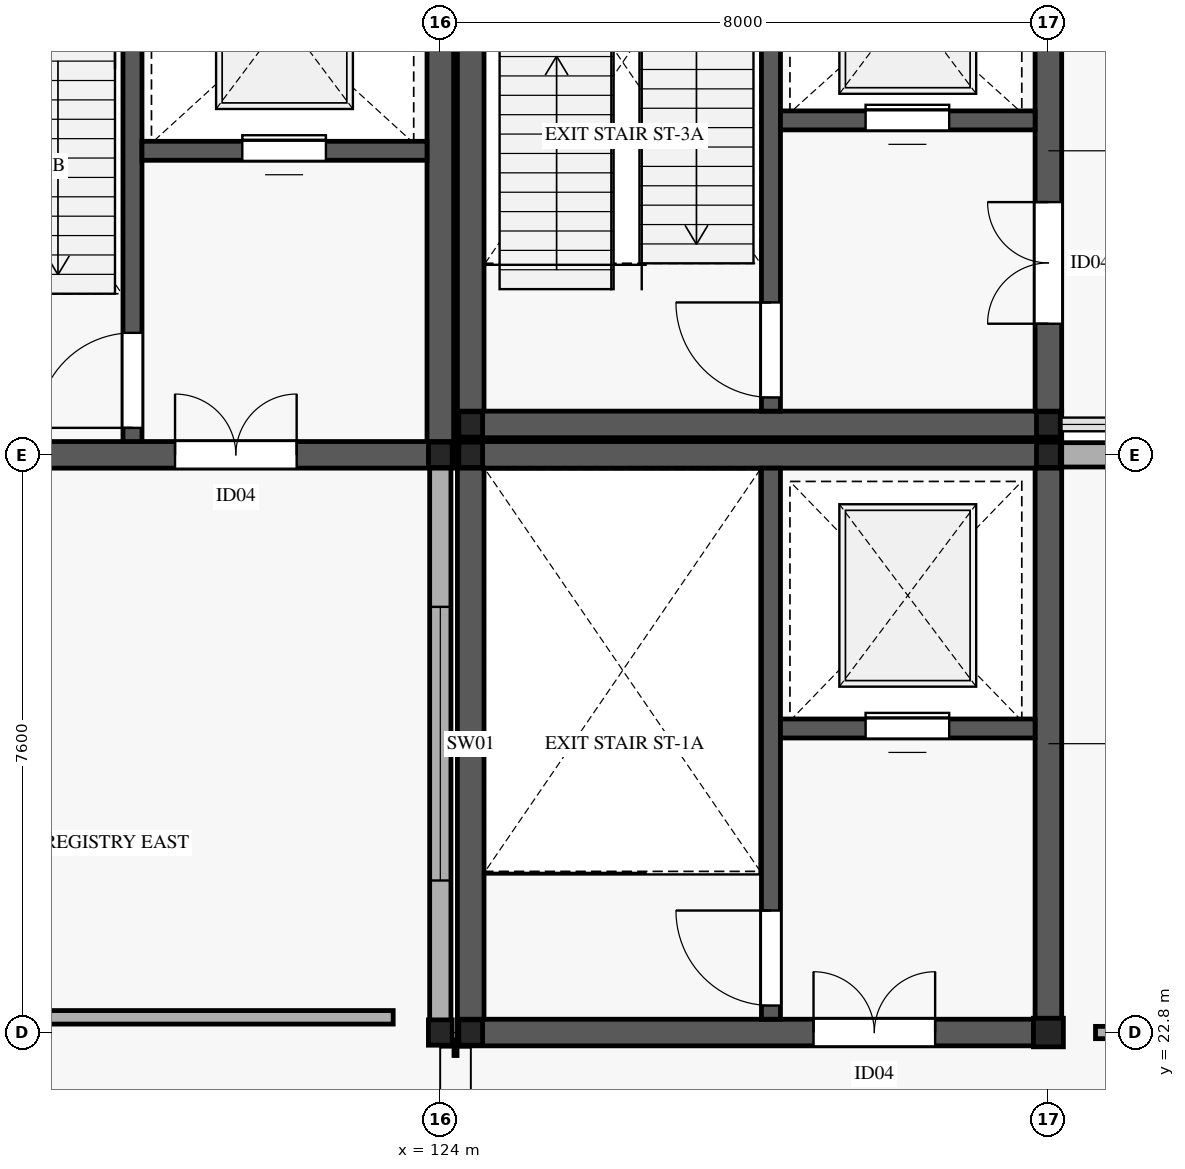
"""IFC4 building model, lengths in metres.
Left out: names, types, materials, properties, quantities, classifications, styles, units other than length and angle.
Written with IfcOpenShell. Run it as: python <this file> out.ifc"""

import sys

from ifc_helpers import new_model, si_unit, direction, frame, frame_2d, origin, origin_2d, place, context, subcontext, project, spatial, rectangle, i_section, extrude, element, fill, save


model = new_model("IFC4")
c1 = context("Model", 3, precision=1e-05, world=origin(), true_north=direction((0.0, 1.0)))
c2 = subcontext(c1, "Body", "Model", "MODEL_VIEW")
j1 = project(units=[si_unit("LENGTHUNIT", "METRE"), si_unit("PLANEANGLEUNIT", "RADIAN")], contexts=[c1])
p1 = place(None, origin())
s1 = spatial("IfcSite", under=j1, at=p1, CompositionType="ELEMENT")
p2 = place(p1, origin())
s2 = spatial("IfcBuilding", under=s1, at=p2, CompositionType="ELEMENT")
p3 = place(p2, frame((0.0, 0.0, 15.6)))
s3 = spatial("IfcBuildingStorey", under=s2, at=p3, CompositionType="ELEMENT", Elevation=15.6)
for number, where, z_axis, x_axis in (
    (1, (124.4, 22.8, 0.0), (0.0, 0.0, 1.0), (1.0, 0.0, 0.0)),
    (2, (124.4, 30.4, 0.0), (0.0, 0.0, 1.0), (1.0, 0.0, 0.0)),
):
    element("IfcColumn", number, at=place(p3, frame(where, z_axis=z_axis, x_axis=x_axis)), inside=s3, PredefinedType="COLUMN", context=c2, shape_type="SweptSolid", body=[
        extrude(i_section(OverallWidth=0.313, OverallDepth=0.333, WebThickness=0.018, FlangeThickness=0.028, FilletRadius=0.015, at=origin_2d()), origin(), (0.0, 0.0, 1.0), 4.595),
    ])
p4 = place(p3, frame((132.0, 22.8, 0.0), z_axis=(0.0, 0.0, 1.0), x_axis=(1.0, 0.0, 0.0)))
e3 = element("IfcColumn", 3, at=p4, inside=s3, PredefinedType="COLUMN", context=c2, shape_type="SweptSolid", body=[
    extrude(i_section(OverallWidth=0.394, OverallDepth=0.376, WebThickness=0.017, FlangeThickness=0.028, FilletRadius=0.015, at=origin_2d()), origin(), (0.0, 0.0, 1.0), 4.595),
])
p5 = place(p3, frame((132.0, 30.4, 0.0), z_axis=(0.0, 0.0, 1.0), x_axis=(1.0, 0.0, 0.0)))
e4 = element("IfcColumn", 4, at=p5, inside=s3, PredefinedType="COLUMN", context=c2, shape_type="SweptSolid", body=[
    extrude(i_section(OverallWidth=0.313, OverallDepth=0.333, WebThickness=0.018, FlangeThickness=0.028, FilletRadius=0.015, at=origin_2d()), origin(), (0.0, 0.0, 1.0), 4.595),
])
for number, where, z_axis, x_axis in (
    (5, (124.4, 30.8, 0.0), (0.0, 0.0, 1.0), (1.0, 0.0, 0.0)),
    (6, (132.0, 30.8, 0.0), (0.0, 0.0, 1.0), (1.0, 0.0, 0.0)),
):
    element("IfcColumn", number, at=place(p3, frame(where, z_axis=z_axis, x_axis=x_axis)), inside=s3, PredefinedType="COLUMN", context=c2, shape_type="SweptSolid", body=[
        extrude(i_section(OverallWidth=0.313, OverallDepth=0.333, WebThickness=0.018, FlangeThickness=0.028, FilletRadius=0.015, at=origin_2d()), origin(), (0.0, 0.0, 1.0), 4.545),
    ])
for number, where, z_axis, x_axis in (
    (7, (124.0, 22.8, 0.0), (0.0, 0.0, 1.0), (1.0, 0.0, 0.0)),
    (8, (124.0, 30.4, 0.0), (0.0, 0.0, 1.0), (1.0, 0.0, 0.0)),
):
    element("IfcColumn", number, at=place(p3, frame(where, z_axis=z_axis, x_axis=x_axis)), inside=s3, PredefinedType="COLUMN", context=c2, shape_type="SweptSolid", body=[
        extrude(i_section(OverallWidth=0.313, OverallDepth=0.333, WebThickness=0.018, FlangeThickness=0.028, FilletRadius=0.015, at=origin_2d()), origin(), (0.0, 0.0, 1.0), 4.59),
    ])
p6 = place(p3, frame((131.98, 30.4, 0.0), z_axis=(0.0, 0.0, 1.0), x_axis=(1.0, 0.0, 0.0)))
e9 = element("IfcWall", 9, at=p6, inside=s3, PredefinedType="STANDARD", context=c2, shape_type="SweptSolid", body=[
    extrude(rectangle(XDim=8.04, YDim=0.32, at=frame_2d((4.02, 0.0))), origin(), (0.0, 0.0, 1.0), 3.66),
])
p7 = place(p6, frame((2.52, 0.0, 0.75)))
e10 = element("IfcOpeningElement", 10, at=p7, cuts=e9, PredefinedType="OPENING", context=c2, shape_type="SweptSolid", body=[
    extrude(rectangle(XDim=3.0, YDim=1.3, at=frame_2d((1.5, 0.65))), frame((0.0, 0.17, 0.0), z_axis=(0.0, -1.0, 0.0), x_axis=(1.0, 0.0, 0.0)), (0.0, 0.0, 1.0), 0.34),
])
p8 = place(p3, frame((124.0, 30.42, 0.0), z_axis=(0.0, 0.0, 1.0), x_axis=(0.0, -1.0, 0.0)))
e11 = element("IfcWall", 11, at=p8, inside=s3, PredefinedType="STANDARD", context=c2, shape_type="SweptSolid", body=[
    extrude(rectangle(XDim=7.64, YDim=0.28, at=frame_2d((3.82, 0.0))), origin(), (0.0, 0.0, 1.0), 3.66),
])
p9 = place(p8, frame((2.02, 0.0, 0.75)))
e12 = element("IfcOpeningElement", 12, at=p9, cuts=e11, PredefinedType="OPENING", context=c2, shape_type="SweptSolid", body=[
    extrude(rectangle(XDim=3.6, YDim=2.15, at=frame_2d((1.8, 1.075))), frame((0.0, 0.15, 0.0), z_axis=(0.0, -1.0, 0.0), x_axis=(1.0, 0.0, 0.0)), (0.0, 0.0, 1.0), 0.3),
])
p10 = place(p3, frame((124.18, 22.6, 0.0), z_axis=(0.0, 0.0, 1.0), x_axis=(1.0, 0.0, 0.0)))
e13 = element("IfcWall", 13, at=p10, inside=s3, PredefinedType="STANDARD", context=c2, shape_type="SweptSolid", body=[
    extrude(rectangle(XDim=0.04, YDim=0.205, at=frame_2d((0.02, 0.0))), origin(), (0.0, 0.0, 1.0), 4.02),
])
p11 = place(p3, frame((124.225, 22.8, 0.0), z_axis=(0.0, 0.0, 1.0), x_axis=(1.0, 0.0, 0.0)))
e14 = element("IfcWall", 14, at=p11, inside=s3, PredefinedType="SHEAR", context=c2, shape_type="SweptSolid", body=[
    extrude(rectangle(XDim=7.95, YDim=0.35, at=frame_2d((3.975, 0.0))), origin(), (0.0, 0.0, 1.0), 4.59),
])
p12 = place(p11, frame((4.685, 0.0, 0.0)))
e15 = element("IfcOpeningElement", 15, at=p12, cuts=e14, PredefinedType="OPENING", context=c2, shape_type="SweptSolid", body=[
    extrude(rectangle(XDim=1.6, YDim=2.35, at=frame_2d((0.8, 1.175))), frame((0.0, 0.185, 0.0), z_axis=(0.0, -1.0, 0.0), x_axis=(1.0, 0.0, 0.0)), (0.0, 0.0, 1.0), 0.37),
])
p13 = place(p3, frame((124.225, 30.4, 0.0), z_axis=(0.0, 0.0, 1.0), x_axis=(1.0, 0.0, 0.0)))
e16 = element("IfcWall", 16, at=p13, inside=s3, PredefinedType="SHEAR", context=c2, shape_type="SweptSolid", body=[
    extrude(rectangle(XDim=7.95, YDim=0.35, at=frame_2d((3.975, 0.0))), origin(), (0.0, 0.0, 1.0), 4.59),
])
for number, where, z_axis, x_axis in (
    (17, (124.4, 22.975, 0.0), (0.0, 0.0, 1.0), (0.0, 1.0, 0.0)),
    (18, (132.0, 22.975, 0.0), (0.0, 0.0, 1.0), (0.0, 1.0, 0.0)),
):
    element("IfcWall", number, at=place(p3, frame(where, z_axis=z_axis, x_axis=x_axis)), inside=s3, PredefinedType="SHEAR", context=c2, shape_type="SweptSolid", body=[
        extrude(rectangle(XDim=7.25, YDim=0.35, at=frame_2d((3.625, 0.0))), origin(), (0.0, 0.0, 1.0), 4.59),
    ])
p14 = place(p3, frame((128.35, 22.975, 0.0), z_axis=(0.0, 0.0, 1.0), x_axis=(0.0, 1.0, 0.0)))
e19 = element("IfcWall", 19, at=p14, inside=s3, PredefinedType="SHEAR", context=c2, shape_type="SweptSolid", body=[
    extrude(rectangle(XDim=7.25, YDim=0.25, at=frame_2d((3.625, 0.0))), origin(), (0.0, 0.0, 1.0), 4.59),
])
p15 = place(p14, frame((0.18, 0.0, 0.0)))
e20 = element("IfcOpeningElement", 20, at=p15, cuts=e19, PredefinedType="OPENING", context=c2, shape_type="SweptSolid", body=[
    extrude(rectangle(XDim=1.25, YDim=2.2, at=frame_2d((0.625, 1.1))), frame((0.0, 0.135, 0.0), z_axis=(0.0, -1.0, 0.0), x_axis=(1.0, 0.0, 0.0)), (0.0, 0.0, 1.0), 0.27),
])
p16 = place(p3, frame((128.475, 26.8, 0.0), z_axis=(0.0, 0.0, 1.0), x_axis=(1.0, 0.0, 0.0)))
e21 = element("IfcWall", 21, at=p16, inside=s3, PredefinedType="SHEAR", context=c2, shape_type="SweptSolid", body=[
    extrude(rectangle(XDim=3.35, YDim=0.25, at=frame_2d((1.675, 0.0))), origin(), (0.0, 0.0, 1.0), 4.59),
])
p17 = place(p16, frame((1.12, 0.0, 0.0)))
e22 = element("IfcOpeningElement", 22, at=p17, cuts=e21, PredefinedType="OPENING", context=c2, shape_type="SweptSolid", body=[
    extrude(rectangle(XDim=1.1, YDim=2.2, at=frame_2d((0.55, 1.1))), frame((0.0, 0.135, 0.0), z_axis=(0.0, -1.0, 0.0), x_axis=(1.0, 0.0, 0.0)), (0.0, 0.0, 1.0), 0.27),
])
p18 = place(p3, frame((124.225, 30.8, 0.0), z_axis=(0.0, 0.0, 1.0), x_axis=(1.0, 0.0, 0.0)))
e23 = element("IfcWall", 23, at=p18, inside=s3, PredefinedType="SHEAR", context=c2, shape_type="SweptSolid", body=[
    extrude(rectangle(XDim=7.95, YDim=0.35, at=frame_2d((3.975, 0.0))), origin(), (0.0, 0.0, 1.0), 4.545),
])
p19 = place(p3, frame((124.4, 30.975, 0.0), z_axis=(0.0, 0.0, 1.0), x_axis=(0.0, 1.0, 0.0)))
e24 = element("IfcWall", 24, at=p19, inside=s3, PredefinedType="SHEAR", context=c2, shape_type="SweptSolid", body=[
    extrude(rectangle(XDim=6.85, YDim=0.35, at=frame_2d((3.425, 0.0))), origin(), (0.0, 0.0, 1.0), 4.545),
])
p20 = place(p3, frame((132.0, 30.975, 0.0), z_axis=(0.0, 0.0, 1.0), x_axis=(0.0, 1.0, 0.0)))
e25 = element("IfcWall", 25, at=p20, inside=s3, PredefinedType="SHEAR", context=c2, shape_type="SweptSolid", body=[
    extrude(rectangle(XDim=6.85, YDim=0.35, at=frame_2d((3.425, 0.0))), origin(), (0.0, 0.0, 1.0), 4.545),
])
p21 = place(p20, frame((1.15, 0.0, 0.0)))
e26 = element("IfcOpeningElement", 26, at=p21, cuts=e25, PredefinedType="OPENING", context=c2, shape_type="SweptSolid", body=[
    extrude(rectangle(XDim=1.6, YDim=2.35, at=frame_2d((0.8, 1.175))), frame((0.0, 0.185, 0.0), z_axis=(0.0, -1.0, 0.0), x_axis=(1.0, 0.0, 0.0)), (0.0, 0.0, 1.0), 0.37),
])
p22 = place(p3, frame((128.35, 30.975, 0.0), z_axis=(0.0, 0.0, 1.0), x_axis=(0.0, 1.0, 0.0)))
e27 = element("IfcWall", 27, at=p22, inside=s3, PredefinedType="SHEAR", context=c2, shape_type="SweptSolid", body=[
    extrude(rectangle(XDim=6.85, YDim=0.25, at=frame_2d((3.425, 0.0))), origin(), (0.0, 0.0, 1.0), 4.545),
])
p23 = place(p22, frame((0.18, 0.0, 0.0)))
e28 = element("IfcOpeningElement", 28, at=p23, cuts=e27, PredefinedType="OPENING", context=c2, shape_type="SweptSolid", body=[
    extrude(rectangle(XDim=1.25, YDim=2.2, at=frame_2d((0.625, 1.1))), frame((0.0, 0.135, 0.0), z_axis=(0.0, -1.0, 0.0), x_axis=(1.0, 0.0, 0.0)), (0.0, 0.0, 1.0), 0.27),
])
p24 = place(p3, frame((128.475, 34.8, 0.0), z_axis=(0.0, 0.0, 1.0), x_axis=(1.0, 0.0, 0.0)))
e29 = element("IfcWall", 29, at=p24, inside=s3, PredefinedType="SHEAR", context=c2, shape_type="SweptSolid", body=[
    extrude(rectangle(XDim=3.35, YDim=0.25, at=frame_2d((1.675, 0.0))), origin(), (0.0, 0.0, 1.0), 4.545),
])
p25 = place(p24, frame((1.12, 0.0, 0.0)))
e30 = element("IfcOpeningElement", 30, at=p25, cuts=e29, PredefinedType="OPENING", context=c2, shape_type="SweptSolid", body=[
    extrude(rectangle(XDim=1.1, YDim=2.2, at=frame_2d((0.55, 1.1))), frame((0.0, 0.135, 0.0), z_axis=(0.0, -1.0, 0.0), x_axis=(1.0, 0.0, 0.0)), (0.0, 0.0, 1.0), 0.27),
])
p26 = place(p3, frame((115.825, 30.4, 0.0), z_axis=(0.0, 0.0, 1.0), x_axis=(1.0, 0.0, 0.0)))
e31 = element("IfcWall", 31, at=p26, inside=s3, PredefinedType="SHEAR", context=c2, shape_type="SweptSolid", body=[
    extrude(rectangle(XDim=8.35, YDim=0.35, at=frame_2d((4.175, 0.0))), origin(), (0.0, 0.0, 1.0), 4.59),
])
p27 = place(p26, frame((4.685, 0.0, 0.0)))
e32 = element("IfcOpeningElement", 32, at=p27, cuts=e31, PredefinedType="OPENING", context=c2, shape_type="SweptSolid", body=[
    extrude(rectangle(XDim=1.6, YDim=2.35, at=frame_2d((0.8, 1.175))), frame((0.0, 0.185, 0.0), z_axis=(0.0, -1.0, 0.0), x_axis=(1.0, 0.0, 0.0)), (0.0, 0.0, 1.0), 0.37),
])
p28 = place(p3, frame((124.0, 30.575, 0.0), z_axis=(0.0, 0.0, 1.0), x_axis=(0.0, 1.0, 0.0)))
e33 = element("IfcWall", 33, at=p28, inside=s3, PredefinedType="SHEAR", context=c2, shape_type="SweptSolid", body=[
    extrude(rectangle(XDim=7.25, YDim=0.35, at=frame_2d((3.625, 0.0))), origin(), (0.0, 0.0, 1.0), 4.59),
])
p29 = place(p3, frame((119.95, 30.575, 0.0), z_axis=(0.0, 0.0, 1.0), x_axis=(0.0, 1.0, 0.0)))
e34 = element("IfcWall", 34, at=p29, inside=s3, PredefinedType="SHEAR", context=c2, shape_type="SweptSolid", body=[
    extrude(rectangle(XDim=7.25, YDim=0.25, at=frame_2d((3.625, 0.0))), origin(), (0.0, 0.0, 1.0), 4.59),
])
p30 = place(p29, frame((0.18, 0.0, 0.0)))
e35 = element("IfcOpeningElement", 35, at=p30, cuts=e34, PredefinedType="OPENING", context=c2, shape_type="SweptSolid", body=[
    extrude(rectangle(XDim=1.25, YDim=2.2, at=frame_2d((0.625, 1.1))), frame((0.0, 0.135, 0.0), z_axis=(0.0, -1.0, 0.0), x_axis=(1.0, 0.0, 0.0)), (0.0, 0.0, 1.0), 0.27),
])
p31 = place(p3, frame((120.075, 34.4, 0.0), z_axis=(0.0, 0.0, 1.0), x_axis=(1.0, 0.0, 0.0)))
e36 = element("IfcWall", 36, at=p31, inside=s3, PredefinedType="SHEAR", context=c2, shape_type="SweptSolid", body=[
    extrude(rectangle(XDim=3.75, YDim=0.25, at=frame_2d((1.875, 0.0))), origin(), (0.0, 0.0, 1.0), 4.59),
])
p32 = place(p31, frame((1.32, 0.0, 0.0)))
e37 = element("IfcOpeningElement", 37, at=p32, cuts=e36, PredefinedType="OPENING", context=c2, shape_type="SweptSolid", body=[
    extrude(rectangle(XDim=1.1, YDim=2.2, at=frame_2d((0.55, 1.1))), frame((0.0, 0.135, 0.0), z_axis=(0.0, -1.0, 0.0), x_axis=(1.0, 0.0, 0.0)), (0.0, 0.0, 1.0), 0.27),
])
p33 = place(p3, frame((132.62, 22.8, 0.0), z_axis=(0.0, 0.0, 1.0), x_axis=(1.0, 0.0, 0.0)))
e38 = element("IfcWall", 38, at=p33, inside=s3, PredefinedType="PARTITIONING", context=c2, shape_type="SweptSolid", body=[
    extrude(rectangle(XDim=15.16, YDim=0.162, at=frame_2d((7.58, 0.0))), origin(), (0.0, 0.0, 1.0), 3.45),
])
p34 = place(p33, frame((5.305, 0.0, 0.0)))
e39 = element("IfcOpeningElement", 39, at=p34, cuts=e38, PredefinedType="OPENING", context=c2, shape_type="SweptSolid", body=[
    extrude(rectangle(XDim=0.95, YDim=2.15, at=frame_2d((0.475, 1.075))), frame((0.0, 0.091, 0.0), z_axis=(0.0, -1.0, 0.0), x_axis=(1.0, 0.0, 0.0)), (0.0, 0.0, 1.0), 0.182),
])
p35 = place(p3, frame((111.62, 23.0, 0.0), z_axis=(0.0, 0.0, 1.0), x_axis=(1.0, 0.0, 0.0)))
e40 = element("IfcWall", 40, at=p35, inside=s3, PredefinedType="PARTITIONING", context=c2, shape_type="SweptSolid", body=[
    extrude(rectangle(XDim=11.76, YDim=0.178, at=frame_2d((5.88, 0.0))), origin(), (0.0, 0.0, 1.0), 3.45),
])
p36 = place(p35, frame((5.37, 0.0, 0.0)))
e41 = element("IfcOpeningElement", 41, at=p36, cuts=e40, PredefinedType="OPENING", context=c2, shape_type="SweptSolid", body=[
    extrude(rectangle(XDim=1.02, YDim=2.25, at=frame_2d((0.51, 1.125))), frame((0.0, 0.099, 0.0), z_axis=(0.0, -1.0, 0.0), x_axis=(1.0, 0.0, 0.0)), (0.0, 0.0, 1.0), 0.198),
])
p37 = place(p9, origin())
e42 = element("IfcWindow", 42, at=p37, inside=s3, PartitioningType="SINGLE_PANEL", PredefinedType="WINDOW", context=c2, shape_type="SweptSolid", body=[
    extrude(rectangle(XDim=3.6, YDim=2.15, at=frame_2d((1.8, 1.075))), frame((0.0, 0.03, 0.0), z_axis=(0.0, -1.0, 0.0), x_axis=(1.0, 0.0, 0.0)), (0.0, 0.0, 1.0), 0.06),
])
fill(e12, e42)
p38 = place(p15, origin())
e43 = element("IfcDoor", 43, at=p38, inside=s3, OperationType="SINGLE_SWING_RIGHT", PredefinedType="DOOR", context=c2, shape_type="SweptSolid", body=[
    extrude(rectangle(XDim=1.25, YDim=2.2, at=frame_2d((0.625, 1.1))), frame((0.0, 0.025, 0.0), z_axis=(0.0, -1.0, 0.0), x_axis=(1.0, 0.0, 0.0)), (0.0, 0.0, 1.0), 0.05),
])
fill(e20, e43)
p39 = place(p12, origin())
e44 = element("IfcDoor", 44, at=p39, inside=s3, OperationType="DOUBLE_DOOR_SINGLE_SWING", PredefinedType="DOOR", context=c2, shape_type="SweptSolid", body=[
    extrude(rectangle(XDim=1.6, YDim=2.35, at=frame_2d((0.8, 1.175))), frame((0.0, 0.025, 0.0), z_axis=(0.0, -1.0, 0.0), x_axis=(1.0, 0.0, 0.0)), (0.0, 0.0, 1.0), 0.05),
])
fill(e15, e44)
p40 = place(p17, origin())
e45 = element("IfcDoor", 45, at=p40, inside=s3, OperationType="SLIDING_TO_LEFT", PredefinedType="DOOR", context=c2, shape_type="SweptSolid", body=[
    extrude(rectangle(XDim=1.1, YDim=2.2, at=frame_2d((0.55, 1.1))), frame((0.0, 0.025, 0.0), z_axis=(0.0, -1.0, 0.0), x_axis=(1.0, 0.0, 0.0)), (0.0, 0.0, 1.0), 0.05),
])
fill(e22, e45)
p41 = place(p23, origin())
e46 = element("IfcDoor", 46, at=p41, inside=s3, OperationType="SINGLE_SWING_RIGHT", PredefinedType="DOOR", context=c2, shape_type="SweptSolid", body=[
    extrude(rectangle(XDim=1.25, YDim=2.2, at=frame_2d((0.625, 1.1))), frame((0.0, 0.025, 0.0), z_axis=(0.0, -1.0, 0.0), x_axis=(1.0, 0.0, 0.0)), (0.0, 0.0, 1.0), 0.05),
])
fill(e28, e46)
p42 = place(p21, origin())
e47 = element("IfcDoor", 47, at=p42, inside=s3, OperationType="DOUBLE_DOOR_SINGLE_SWING", PredefinedType="DOOR", context=c2, shape_type="SweptSolid", body=[
    extrude(rectangle(XDim=1.6, YDim=2.35, at=frame_2d((0.8, 1.175))), frame((0.0, 0.025, 0.0), z_axis=(0.0, -1.0, 0.0), x_axis=(1.0, 0.0, 0.0)), (0.0, 0.0, 1.0), 0.05),
])
fill(e26, e47)
p43 = place(p25, origin())
e48 = element("IfcDoor", 48, at=p43, inside=s3, OperationType="SLIDING_TO_LEFT", PredefinedType="DOOR", context=c2, shape_type="SweptSolid", body=[
    extrude(rectangle(XDim=1.1, YDim=2.2, at=frame_2d((0.55, 1.1))), frame((0.0, 0.025, 0.0), z_axis=(0.0, -1.0, 0.0), x_axis=(1.0, 0.0, 0.0)), (0.0, 0.0, 1.0), 0.05),
])
fill(e30, e48)
p44 = place(p30, origin())
e49 = element("IfcDoor", 49, at=p44, inside=s3, OperationType="SINGLE_SWING_LEFT", PredefinedType="DOOR", context=c2, shape_type="SweptSolid", body=[
    extrude(rectangle(XDim=1.25, YDim=2.2, at=frame_2d((0.625, 1.1))), frame((0.0, 0.025, 0.0), z_axis=(0.0, -1.0, 0.0), x_axis=(1.0, 0.0, 0.0)), (0.0, 0.0, 1.0), 0.05),
])
fill(e35, e49)
p45 = place(p27, origin())
e50 = element("IfcDoor", 50, at=p45, inside=s3, OperationType="DOUBLE_DOOR_SINGLE_SWING", PredefinedType="DOOR", context=c2, shape_type="SweptSolid", body=[
    extrude(rectangle(XDim=1.6, YDim=2.35, at=frame_2d((0.8, 1.175))), frame((0.0, 0.025, 0.0), z_axis=(0.0, -1.0, 0.0), x_axis=(1.0, 0.0, 0.0)), (0.0, 0.0, 1.0), 0.05),
])
fill(e32, e50)
p46 = place(p32, origin())
e51 = element("IfcDoor", 51, at=p46, inside=s3, OperationType="SLIDING_TO_LEFT", PredefinedType="DOOR", context=c2, shape_type="SweptSolid", body=[
    extrude(rectangle(XDim=1.1, YDim=2.2, at=frame_2d((0.55, 1.1))), frame((0.0, 0.025, 0.0), z_axis=(0.0, -1.0, 0.0), x_axis=(1.0, 0.0, 0.0)), (0.0, 0.0, 1.0), 0.05),
])
fill(e37, e51)
save(model, sys.argv[1])
